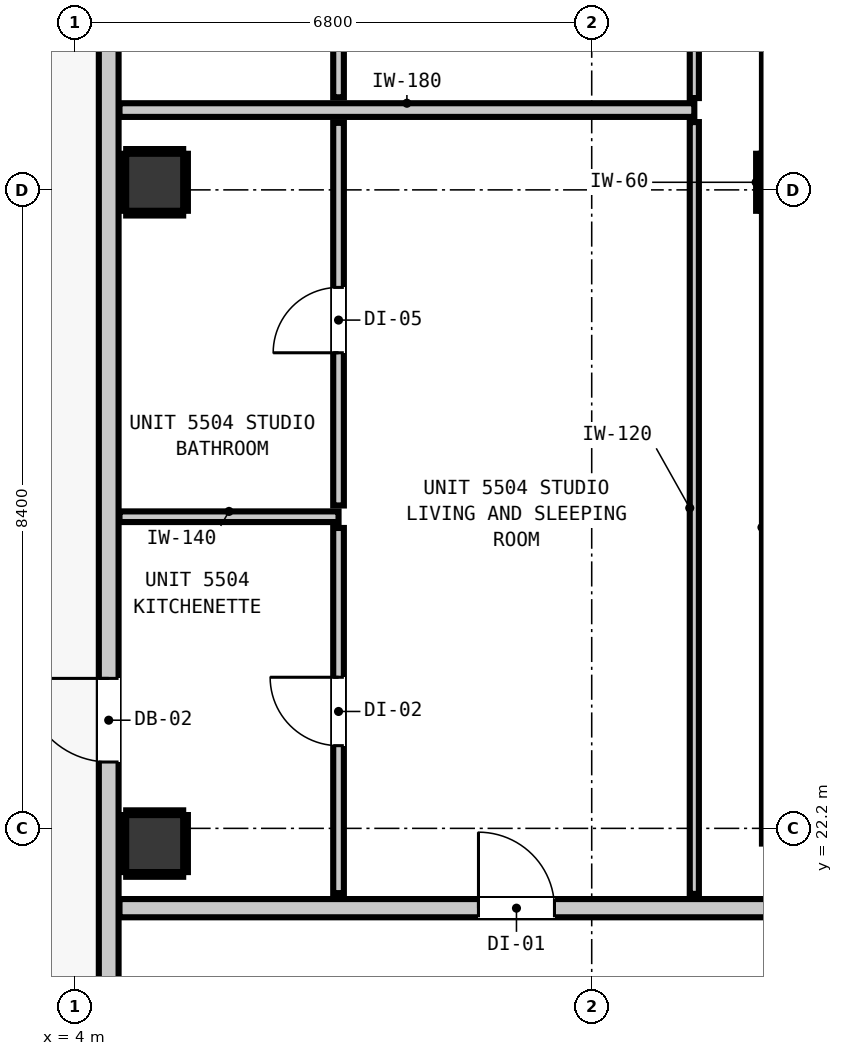
"""IFC4 building model, lengths in metres.
Left out: names, types, materials, properties, quantities, classifications, styles, units other than length and angle.
Written with IfcOpenShell. Run it as: python <this file> out.ifc"""

import sys

from ifc_helpers import new_model, si_unit, direction, frame, frame_2d, origin, origin_2d, place, context, subcontext, project, spatial, rectangle, extrude, element, fill, save


model = new_model("IFC4")
c1 = context("Model", 3, precision=1e-05, world=origin(), true_north=direction((0.0, 1.0)))
c2 = subcontext(c1, "Body", "Model", "MODEL_VIEW")
j1 = project(units=[si_unit("LENGTHUNIT", "METRE"), si_unit("PLANEANGLEUNIT", "RADIAN")], contexts=[c1])
p1 = place(None, origin())
s1 = spatial("IfcSite", under=j1, at=p1, CompositionType="ELEMENT")
p2 = place(p1, origin())
s2 = spatial("IfcBuilding", under=s1, at=p2, CompositionType="ELEMENT")
p3 = place(p2, frame((0.0, 0.0, 190.16)))
s3 = spatial("IfcBuildingStorey", under=s2, at=p3, CompositionType="ELEMENT", Elevation=190.16)
p4 = place(p3, frame((13.4, 30.7, 0.0), z_axis=(0.0, 0.0, 1.0), x_axis=(1.0, 0.0, 0.0)))
e1 = element("IfcColumn", 1, at=p4, inside=s3, PredefinedType="COLUMN", context=c2, shape_type="SweptSolid", body=[
    extrude(rectangle(XDim=0.75, YDim=0.75, at=origin_2d()), origin(), (0.0, 0.0, 1.0), 3.32),
])
p5 = place(p3, frame((13.44, 22.0, 0.0), z_axis=(0.0, 0.0, 1.0), x_axis=(0.0, 1.0, 0.0)))
e2 = element("IfcWall", 2, at=p5, inside=s3, PredefinedType="SHEAR", context=c2, shape_type="SweptSolid", body=[
    extrude(rectangle(XDim=8.32, YDim=0.8, at=frame_2d((4.16, 0.0))), origin(), (0.0, 0.0, 1.0), 3.32),
])
p6 = place(p3, frame((13.44, 31.08, 0.0), z_axis=(0.0, 0.0, 1.0), x_axis=(0.0, 1.0, 0.0)))
e3 = element("IfcWall", 3, at=p6, inside=s3, PredefinedType="SHEAR", context=c2, shape_type="SweptSolid", body=[
    extrude(rectangle(XDim=8.32, YDim=0.8, at=frame_2d((4.16, 0.0))), origin(), (0.0, 0.0, 1.0), 3.32),
])
for number, where, z_axis, x_axis in (
    (4, (5.05, 22.0, -0.2), (0.0, 0.0, 1.0), (1.0, 0.0, 0.0)),
    (5, (5.05, 30.7, -0.2), (0.0, 0.0, 1.0), (1.0, 0.0, 0.0)),
):
    element("IfcColumn", number, at=place(p3, frame(where, z_axis=z_axis, x_axis=x_axis)), inside=s3, PredefinedType="COLUMN", context=c2, shape_type="SweptSolid", body=[
        extrude(rectangle(XDim=0.75, YDim=0.75, at=origin_2d()), origin(), (0.0, 0.0, 1.0), 3.52),
    ])
p7 = place(p3, frame((4.445, 12.345, 0.0), z_axis=(0.0, 0.0, 1.0), x_axis=(0.0, 1.0, 0.0)))
e6 = element("IfcWall", 6, at=p7, inside=s3, PredefinedType="STANDARD", context=c2, shape_type="SweptSolid", body=[
    extrude(rectangle(XDim=30.31, YDim=0.26, at=frame_2d((15.155, 0.0))), origin(), (0.0, 0.0, 1.0), 3.1),
])
p8 = place(p7, frame((10.728, 0.0, 0.0)))
e7 = element("IfcOpeningElement", 7, at=p8, cuts=e6, PredefinedType="OPENING", context=c2, shape_type="SweptSolid", body=[
    extrude(rectangle(XDim=1.1, YDim=2.15, at=frame_2d((0.55, 1.075))), frame((0.0, 0.14, 0.0), z_axis=(0.0, -1.0, 0.0), x_axis=(1.0, 0.0, 0.0)), (0.0, 0.0, 1.0), 0.28),
])
p9 = place(p7, frame((0.252, 0.0, 0.85)))
e8 = element("IfcOpeningElement", 8, at=p9, cuts=e6, PredefinedType="OPENING", context=c2, shape_type="SweptSolid", body=[
    extrude(rectangle(XDim=2.7, YDim=2.0, at=frame_2d((1.35, 1.0))), frame((0.0, 0.14, 0.0), z_axis=(0.0, -1.0, 0.0), x_axis=(1.0, 0.0, 0.0)), (0.0, 0.0, 1.0), 0.28),
])
p10 = place(p3, frame((4.587, 21.15, 0.0), z_axis=(0.0, 0.0, 1.0), x_axis=(1.0, 0.0, 0.0)))
e9 = element("IfcWall", 9, at=p10, inside=s3, PredefinedType="PARTITIONING", context=c2, shape_type="SweptSolid", body=[
    extrude(rectangle(XDim=36.626, YDim=0.24, at=frame_2d((18.313, 0.0))), origin(), (0.0, 0.0, 1.0), 3.1),
])
p11 = place(p10, frame((13.623, 0.0, 0.0)))
e10 = element("IfcOpeningElement", 10, at=p11, cuts=e9, PredefinedType="OPENING", context=c2, shape_type="SweptSolid", body=[
    extrude(rectangle(XDim=1.1, YDim=2.15, at=frame_2d((0.55, 1.075))), frame((0.0, 0.13, 0.0), z_axis=(0.0, -1.0, 0.0), x_axis=(1.0, 0.0, 0.0)), (0.0, 0.0, 1.0), 0.26),
])
p12 = place(p10, frame((4.723, 0.0, 0.0)))
e11 = element("IfcOpeningElement", 11, at=p12, cuts=e9, PredefinedType="OPENING", context=c2, shape_type="SweptSolid", body=[
    extrude(rectangle(XDim=1.0, YDim=2.15, at=frame_2d((0.5, 1.075))), frame((0.0, 0.13, 0.0), z_axis=(0.0, -1.0, 0.0), x_axis=(1.0, 0.0, 0.0)), (0.0, 0.0, 1.0), 0.26),
])
p13 = place(p3, frame((4.587, 31.65, 0.0), z_axis=(0.0, 0.0, 1.0), x_axis=(1.0, 0.0, 0.0)))
e12 = element("IfcWall", 12, at=p13, inside=s3, PredefinedType="PARTITIONING", context=c2, shape_type="SweptSolid", body=[
    extrude(rectangle(XDim=7.563, YDim=0.18, at=frame_2d((3.781, 0.0))), origin(), (0.0, 0.0, 1.0), 3.1),
])
p14 = place(p3, frame((4.587, 26.3, 0.0), z_axis=(0.0, 0.0, 1.0), x_axis=(1.0, 0.0, 0.0)))
e13 = element("IfcWall", 13, at=p14, inside=s3, PredefinedType="PARTITIONING", context=c2, shape_type="SweptSolid", body=[
    extrude(rectangle(XDim=2.882, YDim=0.14, at=frame_2d((1.441, 0.0))), origin(), (0.0, 0.0, 1.0), 3.1),
])
p15 = place(p3, frame((7.469, 21.348, 0.0), z_axis=(0.0, 0.0, 1.0), x_axis=(0.0, 1.0, 0.0)))
e14 = element("IfcWall", 14, at=p15, inside=s3, PredefinedType="PARTITIONING", context=c2, shape_type="SweptSolid", body=[
    extrude(rectangle(XDim=4.804, YDim=0.14, at=frame_2d((2.402, 0.0))), origin(), (0.0, 0.0, 1.0), 3.1),
])
p16 = place(p15, frame((1.94, 0.0, 0.0)))
e15 = element("IfcOpeningElement", 15, at=p16, cuts=e14, PredefinedType="OPENING", context=c2, shape_type="SweptSolid", body=[
    extrude(rectangle(XDim=0.9, YDim=2.1, at=frame_2d((0.45, 1.05))), frame((0.0, 0.08, 0.0), z_axis=(0.0, -1.0, 0.0), x_axis=(1.0, 0.0, 0.0)), (0.0, 0.0, 1.0), 0.16),
])
p17 = place(p3, frame((7.469, 26.448, 0.0), z_axis=(0.0, 0.0, 1.0), x_axis=(0.0, 1.0, 0.0)))
e16 = element("IfcWall", 16, at=p17, inside=s3, PredefinedType="PARTITIONING", context=c2, shape_type="SweptSolid", body=[
    extrude(rectangle(XDim=5.034, YDim=0.14, at=frame_2d((2.517, 0.0))), origin(), (0.0, 0.0, 1.0), 3.1),
])
p18 = place(p17, frame((2.009, 0.0, 0.0)))
e17 = element("IfcOpeningElement", 17, at=p18, cuts=e16, PredefinedType="OPENING", context=c2, shape_type="SweptSolid", body=[
    extrude(rectangle(XDim=0.86, YDim=2.02, at=frame_2d((0.43, 1.01))), frame((0.0, 0.08, 0.0), z_axis=(0.0, -1.0, 0.0), x_axis=(1.0, 0.0, 0.0)), (0.0, 0.0, 1.0), 0.16),
])
p19 = place(p3, frame((7.469, 31.818, 0.0), z_axis=(0.0, 0.0, 1.0), x_axis=(0.0, 1.0, 0.0)))
e18 = element("IfcWall", 18, at=p19, inside=s3, PredefinedType="PARTITIONING", context=c2, shape_type="SweptSolid", body=[
    extrude(rectangle(XDim=4.521, YDim=0.14, at=frame_2d((2.26, 0.0))), origin(), (0.0, 0.0, 1.0), 3.1),
])
p20 = place(p19, frame((1.758, 0.0, 0.0)))
e19 = element("IfcOpeningElement", 19, at=p20, cuts=e18, PredefinedType="OPENING", context=c2, shape_type="SweptSolid", body=[
    extrude(rectangle(XDim=0.86, YDim=2.02, at=frame_2d((0.43, 1.01))), frame((0.0, 0.08, 0.0), z_axis=(0.0, -1.0, 0.0), x_axis=(1.0, 0.0, 0.0)), (0.0, 0.0, 1.0), 0.16),
])
p21 = place(p3, frame((12.15, 21.338, 0.0), z_axis=(0.0, 0.0, 1.0), x_axis=(0.0, 1.0, 0.0)))
e20 = element("IfcWall", 20, at=p21, inside=s3, PredefinedType="PARTITIONING", context=c2, shape_type="SweptSolid", body=[
    extrude(rectangle(XDim=10.154, YDim=0.12, at=frame_2d((5.077, 0.0))), origin(), (0.0, 0.0, 1.0), 3.1),
])
p22 = place(p3, frame((12.15, 31.808, 0.0), z_axis=(0.0, 0.0, 1.0), x_axis=(0.0, 1.0, 0.0)))
e21 = element("IfcWall", 21, at=p22, inside=s3, PredefinedType="PARTITIONING", context=c2, shape_type="SweptSolid", body=[
    extrude(rectangle(XDim=8.284, YDim=0.12, at=frame_2d((4.142, 0.0))), origin(), (0.0, 0.0, 1.0), 3.1),
])
for number, where, z_axis, x_axis in (
    (22, (12.993, 30.325, 0.0), (0.0, 0.0, 1.0), (0.0, 1.0, 0.0)),
    (23, (4.675, 21.593, 0.0), (0.0, 0.0, 1.0), (1.0, 0.0, 0.0)),
    (24, (4.675, 22.407, 0.0), (0.0, 0.0, 1.0), (1.0, 0.0, 0.0)),
    (25, (4.643, 21.625, 0.0), (0.0, 0.0, 1.0), (0.0, 1.0, 0.0)),
    (26, (5.457, 21.625, 0.0), (0.0, 0.0, 1.0), (0.0, 1.0, 0.0)),
    (27, (4.675, 30.293, 0.0), (0.0, 0.0, 1.0), (1.0, 0.0, 0.0)),
    (28, (4.675, 31.107, 0.0), (0.0, 0.0, 1.0), (1.0, 0.0, 0.0)),
    (29, (4.643, 30.325, 0.0), (0.0, 0.0, 1.0), (0.0, 1.0, 0.0)),
    (30, (5.457, 30.325, 0.0), (0.0, 0.0, 1.0), (0.0, 1.0, 0.0)),
):
    element("IfcWall", number, at=place(p3, frame(where, z_axis=z_axis, x_axis=x_axis)), inside=s3, PredefinedType="PARTITIONING", context=c2, shape_type="SweptSolid", body=[
        extrude(rectangle(XDim=0.75, YDim=0.06, at=frame_2d((0.375, 0.0))), origin(), (0.0, 0.0, 1.0), 1.45),
    ])
p23 = place(p8, origin())
e31 = element("IfcDoor", 31, at=p23, inside=s3, OperationType="SINGLE_SWING_RIGHT", PredefinedType="DOOR", context=c2, shape_type="SweptSolid", body=[
    extrude(rectangle(XDim=1.1, YDim=2.15, at=frame_2d((0.55, 1.075))), frame((0.0, 0.025, 0.0), z_axis=(0.0, -1.0, 0.0), x_axis=(1.0, 0.0, 0.0)), (0.0, 0.0, 1.0), 0.05),
])
fill(e7, e31)
p24 = place(p12, origin())
e32 = element("IfcDoor", 32, at=p24, inside=s3, OperationType="SINGLE_SWING_LEFT", PredefinedType="DOOR", context=c2, shape_type="SweptSolid", body=[
    extrude(rectangle(XDim=1.0, YDim=2.15, at=frame_2d((0.5, 1.075))), frame((0.0, 0.025, 0.0), z_axis=(0.0, -1.0, 0.0), x_axis=(1.0, 0.0, 0.0)), (0.0, 0.0, 1.0), 0.05),
])
fill(e11, e32)
p25 = place(p16, origin())
e33 = element("IfcDoor", 33, at=p25, inside=s3, OperationType="SINGLE_SWING_RIGHT", PredefinedType="DOOR", context=c2, shape_type="SweptSolid", body=[
    extrude(rectangle(XDim=0.9, YDim=2.1, at=frame_2d((0.45, 1.05))), frame((0.0, 0.025, 0.0), z_axis=(0.0, -1.0, 0.0), x_axis=(1.0, 0.0, 0.0)), (0.0, 0.0, 1.0), 0.05),
])
fill(e15, e33)
p26 = place(p18, origin())
e34 = element("IfcDoor", 34, at=p26, inside=s3, OperationType="SINGLE_SWING_LEFT", PredefinedType="DOOR", context=c2, shape_type="SweptSolid", body=[
    extrude(rectangle(XDim=0.86, YDim=2.02, at=frame_2d((0.43, 1.01))), frame((0.0, 0.025, 0.0), z_axis=(0.0, -1.0, 0.0), x_axis=(1.0, 0.0, 0.0)), (0.0, 0.0, 1.0), 0.05),
])
fill(e17, e34)
save(model, sys.argv[1])
